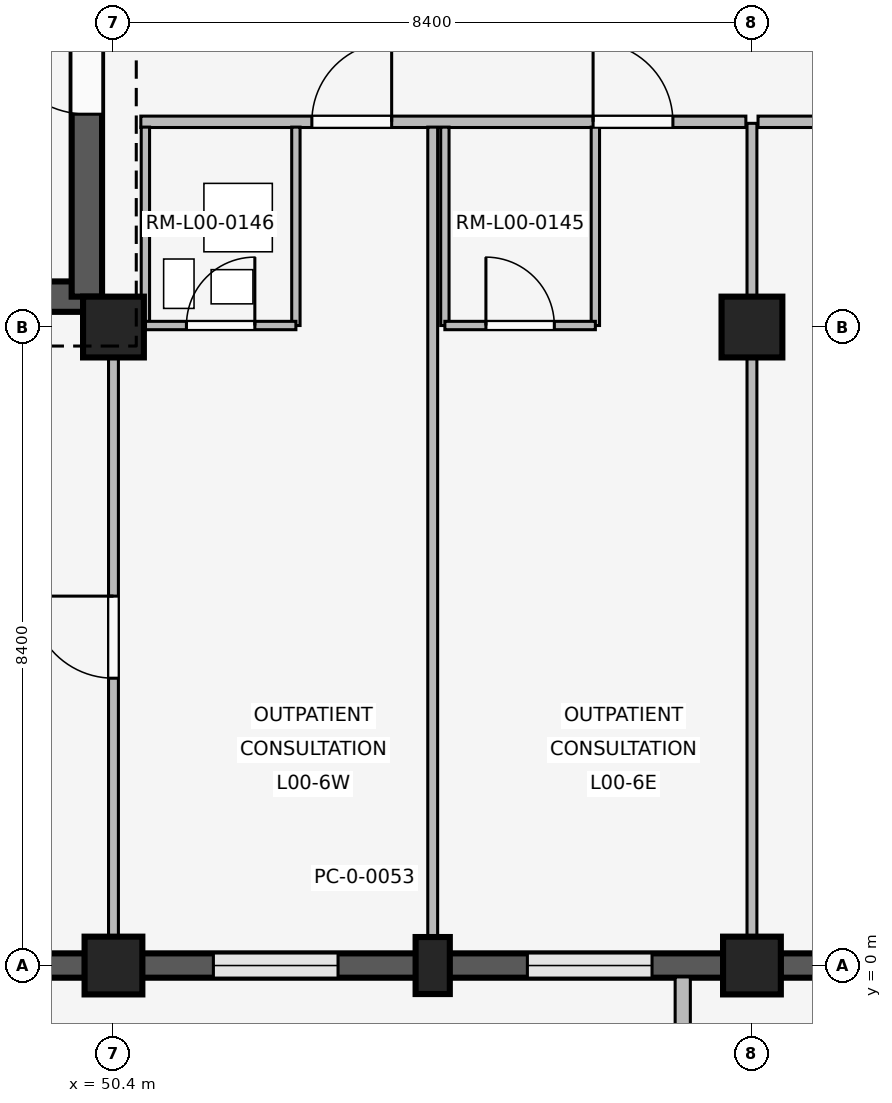
"""IFC4 building model, lengths in metres.
Left out: names, types, materials, properties, quantities, classifications, styles, units other than length and angle.
Written with IfcOpenShell. Run it as: python <this file> out.ifc"""

import sys

from ifc_helpers import new_model, si_unit, direction, frame, frame_2d, origin, origin_2d, place, context, subcontext, project, spatial, rectangle, extrude, element, fill, save


model = new_model("IFC4")
c1 = context("Model", 3, precision=1e-05, world=origin(), true_north=direction((0.0, 1.0)))
c2 = subcontext(c1, "Body", "Model", "MODEL_VIEW")
j1 = project(units=[si_unit("LENGTHUNIT", "METRE"), si_unit("PLANEANGLEUNIT", "RADIAN")], contexts=[c1])
p1 = place(None, origin())
s1 = spatial("IfcSite", under=j1, at=p1, CompositionType="ELEMENT")
p2 = place(p1, origin())
s2 = spatial("IfcBuilding", under=s1, at=p2, CompositionType="ELEMENT")
p3 = place(p2, origin())
s3 = spatial("IfcBuildingStorey", under=s2, at=p3, CompositionType="ELEMENT", Elevation=0.0)
p4 = place(p3, frame((50.4, 0.0, 0.0), z_axis=(0.0, 0.0, 1.0), x_axis=(1.0, 0.0, 0.0)))
e1 = element("IfcColumn", 1, at=p4, inside=s3, PredefinedType="COLUMN", context=c2, shape_type="SweptSolid", body=[
    extrude(rectangle(XDim=0.76, YDim=0.76, at=origin_2d()), origin(), (0.0, 0.0, 1.0), 4.8),
])
p5 = place(p3, frame((50.4, 8.4, 0.0), z_axis=(0.0, 0.0, 1.0), x_axis=(1.0, 0.0, 0.0)))
e2 = element("IfcColumn", 2, at=p5, inside=s3, PredefinedType="COLUMN", context=c2, shape_type="SweptSolid", body=[
    extrude(rectangle(XDim=0.8, YDim=0.8, at=origin_2d()), origin(), (0.0, 0.0, 1.0), 4.8),
])
p6 = place(p3, frame((58.8, 0.0, 0.0), z_axis=(0.0, 0.0, 1.0), x_axis=(1.0, 0.0, 0.0)))
e3 = element("IfcColumn", 3, at=p6, inside=s3, PredefinedType="COLUMN", context=c2, shape_type="SweptSolid", body=[
    extrude(rectangle(XDim=0.76, YDim=0.76, at=origin_2d()), origin(), (0.0, 0.0, 1.0), 4.8),
])
p7 = place(p3, frame((58.8, 8.4, 0.0), z_axis=(0.0, 0.0, 1.0), x_axis=(1.0, 0.0, 0.0)))
e4 = element("IfcColumn", 4, at=p7, inside=s3, PredefinedType="COLUMN", context=c2, shape_type="SweptSolid", body=[
    extrude(rectangle(XDim=0.8, YDim=0.8, at=origin_2d()), origin(), (0.0, 0.0, 1.0), 4.8),
])
p8 = place(p3, frame((54.6, 0.0, 0.0), z_axis=(0.0, 0.0, 1.0), x_axis=(1.0, 0.0, 0.0)))
e5 = element("IfcColumn", 5, at=p8, inside=s3, PredefinedType="PILASTER", context=c2, shape_type="SweptSolid", body=[
    extrude(rectangle(XDim=0.45, YDim=0.75, at=origin_2d()), origin(), (0.0, 0.0, 1.0), 4.8),
])
p9 = place(p3, frame((50.025, 0.0, 0.0), z_axis=(0.0, 0.0, 1.0), x_axis=(-1.0, 0.0, 0.0)))
e6 = element("IfcWall", 6, at=p9, inside=s3, PredefinedType="SOLIDWALL", context=c2, shape_type="SweptSolid", body=[
    extrude(rectangle(XDim=7.65, YDim=0.32, at=frame_2d((3.825, 0.0))), origin(), (0.0, 0.0, 1.0), 3.82),
])
p10 = place(p9, frame((5.375, 0.0, 0.0)))
e7 = element("IfcOpeningElement", 7, at=p10, cuts=e6, PredefinedType="OPENING", context=c2, shape_type="SweptSolid", body=[
    extrude(rectangle(XDim=1.2, YDim=2.25, at=frame_2d((0.6, 1.125))), frame((0.0, 0.17, 0.0), z_axis=(0.0, -1.0, 0.0), x_axis=(1.0, 0.0, 0.0)), (0.0, 0.0, 1.0), 0.34),
])
p11 = place(p9, frame((0.8, 0.0, 0.85)))
e8 = element("IfcOpeningElement", 8, at=p11, cuts=e6, PredefinedType="OPENING", context=c2, shape_type="SweptSolid", body=[
    extrude(rectangle(XDim=1.1, YDim=1.6, at=frame_2d((0.55, 0.8))), frame((0.0, 0.17, 0.0), z_axis=(0.0, -1.0, 0.0), x_axis=(1.0, 0.0, 0.0)), (0.0, 0.0, 1.0), 0.34),
])
p12 = place(p9, frame((2.9, 0.0, 0.85)))
e9 = element("IfcOpeningElement", 9, at=p12, cuts=e6, PredefinedType="OPENING", context=c2, shape_type="SweptSolid", body=[
    extrude(rectangle(XDim=1.1, YDim=1.6, at=frame_2d((0.55, 0.8))), frame((0.0, 0.17, 0.0), z_axis=(0.0, -1.0, 0.0), x_axis=(1.0, 0.0, 0.0)), (0.0, 0.0, 1.0), 0.34),
])
p13 = place(p3, frame((58.425, 0.0, 0.0), z_axis=(0.0, 0.0, 1.0), x_axis=(-1.0, 0.0, 0.0)))
e10 = element("IfcWall", 10, at=p13, inside=s3, PredefinedType="SOLIDWALL", context=c2, shape_type="SweptSolid", body=[
    extrude(rectangle(XDim=7.65, YDim=0.32, at=frame_2d((3.825, 0.0))), origin(), (0.0, 0.0, 1.0), 3.82),
])
p14 = place(p13, frame((0.939, 0.0, 0.85)))
e11 = element("IfcOpeningElement", 11, at=p14, cuts=e10, PredefinedType="OPENING", context=c2, shape_type="SweptSolid", body=[
    extrude(rectangle(XDim=1.64, YDim=1.75, at=frame_2d((0.82, 0.875))), frame((0.0, 0.17, 0.0), z_axis=(0.0, -1.0, 0.0), x_axis=(1.0, 0.0, 0.0)), (0.0, 0.0, 1.0), 0.34),
])
p15 = place(p13, frame((5.071, 0.0, 0.85)))
e12 = element("IfcOpeningElement", 12, at=p15, cuts=e10, PredefinedType="OPENING", context=c2, shape_type="SweptSolid", body=[
    extrude(rectangle(XDim=1.64, YDim=1.75, at=frame_2d((0.82, 0.875))), frame((0.0, 0.17, 0.0), z_axis=(0.0, -1.0, 0.0), x_axis=(1.0, 0.0, 0.0)), (0.0, 0.0, 1.0), 0.34),
])
p16 = place(p3, frame((57.889, -0.15, 0.0), z_axis=(0.0, 0.0, 1.0), x_axis=(0.0, -1.0, 0.0)))
e13 = element("IfcWall", 13, at=p16, inside=s3, PredefinedType="ELEMENTEDWALL", context=c2, shape_type="SweptSolid", body=[
    extrude(rectangle(XDim=0.85, YDim=0.2, at=frame_2d((0.425, 0.0))), origin(), (0.0, 0.0, 1.0), 3.8),
])
p17 = place(p3, frame((66.825, 0.0, 0.0), z_axis=(0.0, 0.0, 1.0), x_axis=(-1.0, 0.0, 0.0)))
e14 = element("IfcWall", 14, at=p17, inside=s3, PredefinedType="SOLIDWALL", context=c2, shape_type="SweptSolid", body=[
    extrude(rectangle(XDim=7.65, YDim=0.32, at=frame_2d((3.825, 0.0))), origin(), (0.0, 0.0, 1.0), 3.82),
])
p18 = place(p17, frame((2.825, 0.0, 0.0)))
e15 = element("IfcOpeningElement", 15, at=p18, cuts=e14, PredefinedType="OPENING", context=c2, shape_type="SweptSolid", body=[
    extrude(rectangle(XDim=2.0, YDim=2.4, at=frame_2d((1.0, 1.2))), frame((0.0, 0.17, 0.0), z_axis=(0.0, -1.0, 0.0), x_axis=(1.0, 0.0, 0.0)), (0.0, 0.0, 1.0), 0.34),
])
p19 = place(p3, frame((42.55, 8.8, 0.0), z_axis=(0.0, 0.0, 1.0), x_axis=(1.0, 0.0, 0.0)))
e16 = element("IfcWall", 16, at=p19, inside=s3, PredefinedType="SHEAR", context=c2, shape_type="SweptSolid", body=[
    extrude(rectangle(XDim=7.5, YDim=0.4, at=frame_2d((3.75, 0.0))), origin(), (0.0, 0.0, 1.0), 4.52),
])
p20 = place(p19, frame((4.85, 0.0, 0.0)))
e17 = element("IfcOpeningElement", 17, at=p20, cuts=e16, PredefinedType="OPENING", context=c2, shape_type="SweptSolid", body=[
    extrude(rectangle(XDim=1.2, YDim=2.2, at=frame_2d((0.6, 1.1))), frame((0.0, 0.21, 0.0), z_axis=(0.0, -1.0, 0.0), x_axis=(1.0, 0.0, 0.0)), (0.0, 0.0, 1.0), 0.42),
])
p21 = place(p19, frame((0.9, 0.0, 0.0)))
e18 = element("IfcOpeningElement", 18, at=p21, cuts=e16, PredefinedType="OPENING", context=c2, shape_type="SweptSolid", body=[
    extrude(rectangle(XDim=1.2, YDim=2.2, at=frame_2d((0.6, 1.1))), frame((0.0, 0.21, 0.0), z_axis=(0.0, -1.0, 0.0), x_axis=(1.0, 0.0, 0.0)), (0.0, 0.0, 1.0), 0.42),
])
p22 = place(p3, frame((50.05, 8.8, 0.0), z_axis=(0.0, 0.0, 1.0), x_axis=(0.0, 1.0, 0.0)))
e19 = element("IfcWall", 19, at=p22, inside=s3, PredefinedType="SHEAR", context=c2, shape_type="SweptSolid", body=[
    extrude(rectangle(XDim=7.55, YDim=0.4, at=frame_2d((3.775, 0.0))), origin(), (0.0, 0.0, 1.0), 4.52),
])
p23 = place(p22, frame((2.4, 0.0, 0.0)))
e20 = element("IfcOpeningElement", 20, at=p23, cuts=e19, PredefinedType="OPENING", context=c2, shape_type="SweptSolid", body=[
    extrude(rectangle(XDim=1.2, YDim=2.2, at=frame_2d((0.6, 1.1))), frame((0.0, 0.21, 0.0), z_axis=(0.0, -1.0, 0.0), x_axis=(1.0, 0.0, 0.0)), (0.0, 0.0, 1.0), 0.42),
])
p24 = place(p3, frame((50.4, 0.14, 0.0), z_axis=(0.0, 0.0, 1.0), x_axis=(0.0, 1.0, 0.0)))
e21 = element("IfcWall", 21, at=p24, inside=s3, PredefinedType="PARTITIONING", context=c2, shape_type="SweptSolid", body=[
    extrude(rectangle(XDim=8.21, YDim=0.13, at=frame_2d((4.105, 0.0))), origin(), (0.0, 0.0, 1.0), 3.8),
])
p25 = place(p24, frame((3.64, 0.0, 0.0)))
e22 = element("IfcOpeningElement", 22, at=p25, cuts=e21, PredefinedType="OPENING", context=c2, shape_type="SweptSolid", body=[
    extrude(rectangle(XDim=1.08, YDim=2.15, at=frame_2d((0.54, 1.075))), frame((0.0, 0.075, 0.0), z_axis=(0.0, -1.0, 0.0), x_axis=(1.0, 0.0, 0.0)), (0.0, 0.0, 1.0), 0.15),
])
p26 = place(p3, frame((50.76, 11.1, 0.0), z_axis=(0.0, 0.0, 1.0), x_axis=(1.0, 0.0, 0.0)))
e23 = element("IfcWall", 23, at=p26, inside=s3, PredefinedType="PARTITIONING", context=c2, shape_type="SweptSolid", body=[
    extrude(rectangle(XDim=7.96, YDim=0.15, at=frame_2d((3.98, 0.0))), origin(), (0.0, 0.0, 1.0), 3.8),
])
p27 = place(p26, frame((2.25, 0.0, 0.0)))
e24 = element("IfcOpeningElement", 24, at=p27, cuts=e23, PredefinedType="OPENING", context=c2, shape_type="SweptSolid", body=[
    extrude(rectangle(XDim=1.05, YDim=2.2, at=frame_2d((0.525, 1.1))), frame((0.0, 0.085, 0.0), z_axis=(0.0, -1.0, 0.0), x_axis=(1.0, 0.0, 0.0)), (0.0, 0.0, 1.0), 0.17),
])
p28 = place(p26, frame((5.95, 0.0, 0.0)))
e25 = element("IfcOpeningElement", 25, at=p28, cuts=e23, PredefinedType="OPENING", context=c2, shape_type="SweptSolid", body=[
    extrude(rectangle(XDim=1.05, YDim=2.2, at=frame_2d((0.525, 1.1))), frame((0.0, 0.085, 0.0), z_axis=(0.0, -1.0, 0.0), x_axis=(1.0, 0.0, 0.0)), (0.0, 0.0, 1.0), 0.17),
])
p29 = place(p3, frame((54.6, 0.1, 0.0), z_axis=(0.0, 0.0, 1.0), x_axis=(0.0, 1.0, 0.0)))
e26 = element("IfcWall", 26, at=p29, inside=s3, PredefinedType="PARTITIONING", context=c2, shape_type="SweptSolid", body=[
    extrude(rectangle(XDim=10.93, YDim=0.13, at=frame_2d((5.465, 0.0))), origin(), (0.0, 0.0, 1.0), 3.8),
])
for number, where, z_axis, x_axis in (
    (27, (50.82, 8.42, 0.0), (0.0, 0.0, 1.0), (0.0, 1.0, 0.0)),
    (28, (52.8, 8.42, 0.0), (0.0, 0.0, 1.0), (0.0, 1.0, 0.0)),
):
    element("IfcWall", number, at=place(p3, frame(where, z_axis=z_axis, x_axis=x_axis)), inside=s3, PredefinedType="PARTITIONING", context=c2, shape_type="SweptSolid", body=[
        extrude(rectangle(XDim=2.61, YDim=0.11, at=frame_2d((1.305, 0.0))), origin(), (0.0, 0.0, 1.0), 3.8),
    ])
p30 = place(p3, frame((50.82, 8.42, 0.0), z_axis=(0.0, 0.0, 1.0), x_axis=(1.0, 0.0, 0.0)))
e29 = element("IfcWall", 29, at=p30, inside=s3, PredefinedType="PARTITIONING", context=c2, shape_type="SweptSolid", body=[
    extrude(rectangle(XDim=1.98, YDim=0.11, at=frame_2d((0.99, 0.0))), origin(), (0.0, 0.0, 1.0), 3.8),
])
p31 = place(p30, frame((0.54, 0.0, 0.0)))
e30 = element("IfcOpeningElement", 30, at=p31, cuts=e29, PredefinedType="OPENING", context=c2, shape_type="SweptSolid", body=[
    extrude(rectangle(XDim=0.9, YDim=2.1, at=frame_2d((0.45, 1.05))), frame((0.0, 0.065, 0.0), z_axis=(0.0, -1.0, 0.0), x_axis=(1.0, 0.0, 0.0)), (0.0, 0.0, 1.0), 0.13),
])
for number, where, z_axis, x_axis in (
    (31, (54.76, 8.42, 0.0), (0.0, 0.0, 1.0), (0.0, 1.0, 0.0)),
    (32, (56.74, 8.42, 0.0), (0.0, 0.0, 1.0), (0.0, 1.0, 0.0)),
):
    element("IfcWall", number, at=place(p3, frame(where, z_axis=z_axis, x_axis=x_axis)), inside=s3, PredefinedType="PARTITIONING", context=c2, shape_type="SweptSolid", body=[
        extrude(rectangle(XDim=2.61, YDim=0.11, at=frame_2d((1.305, 0.0))), origin(), (0.0, 0.0, 1.0), 3.8),
    ])
p32 = place(p3, frame((54.76, 8.42, 0.0), z_axis=(0.0, 0.0, 1.0), x_axis=(1.0, 0.0, 0.0)))
e33 = element("IfcWall", 33, at=p32, inside=s3, PredefinedType="PARTITIONING", context=c2, shape_type="SweptSolid", body=[
    extrude(rectangle(XDim=1.98, YDim=0.11, at=frame_2d((0.99, 0.0))), origin(), (0.0, 0.0, 1.0), 3.8),
])
p33 = place(p32, frame((0.54, 0.0, 0.0)))
e34 = element("IfcOpeningElement", 34, at=p33, cuts=e33, PredefinedType="OPENING", context=c2, shape_type="SweptSolid", body=[
    extrude(rectangle(XDim=0.9, YDim=2.1, at=frame_2d((0.45, 1.05))), frame((0.0, 0.065, 0.0), z_axis=(0.0, -1.0, 0.0), x_axis=(1.0, 0.0, 0.0)), (0.0, 0.0, 1.0), 0.13),
])
p34 = place(p3, frame((53.25, 1.15, 0.0), z_axis=(0.0, 0.0, 1.0), x_axis=(1.0, 0.0, 0.0)))
e35 = element("IfcWall", 35, at=p34, inside=s3, PredefinedType="PLUMBINGWALL", context=c2, shape_type="SweptSolid", body=[
    extrude(rectangle(XDim=0.9, YDim=0.24, at=frame_2d((0.45, 0.0))), origin(), (0.0, 0.0, 1.0), 3.8),
])
p35 = place(p3, frame((58.8, 0.14, 0.0), z_axis=(0.0, 0.0, 1.0), x_axis=(0.0, 1.0, 0.0)))
e36 = element("IfcWall", 36, at=p35, inside=s3, PredefinedType="PARTITIONING", context=c2, shape_type="SweptSolid", body=[
    extrude(rectangle(XDim=10.94, YDim=0.13, at=frame_2d((5.47, 0.0))), origin(), (0.0, 0.0, 1.0), 3.8),
])
p36 = place(p3, frame((58.88, 11.1, 0.0), z_axis=(0.0, 0.0, 1.0), x_axis=(1.0, 0.0, 0.0)))
e37 = element("IfcWall", 37, at=p36, inside=s3, PredefinedType="PARTITIONING", context=c2, shape_type="SweptSolid", body=[
    extrude(rectangle(XDim=8.24, YDim=0.15, at=frame_2d((4.12, 0.0))), origin(), (0.0, 0.0, 1.0), 3.8),
])
p37 = place(p36, frame((1.53, 0.0, 0.0)))
e38 = element("IfcOpeningElement", 38, at=p37, cuts=e37, PredefinedType="OPENING", context=c2, shape_type="SweptSolid", body=[
    extrude(rectangle(XDim=1.85, YDim=2.3, at=frame_2d((0.925, 1.15))), frame((0.0, 0.085, 0.0), z_axis=(0.0, -1.0, 0.0), x_axis=(1.0, 0.0, 0.0)), (0.0, 0.0, 1.0), 0.17),
])
p38 = place(p14, origin())
e39 = element("IfcWindow", 39, at=p38, inside=s3, PartitioningType="SINGLE_PANEL", PredefinedType="WINDOW", context=c2, shape_type="SweptSolid", body=[
    extrude(rectangle(XDim=1.64, YDim=1.75, at=frame_2d((0.82, 0.875))), frame((0.0, 0.03, 0.0), z_axis=(0.0, -1.0, 0.0), x_axis=(1.0, 0.0, 0.0)), (0.0, 0.0, 1.0), 0.06),
])
fill(e11, e39)
p39 = place(p15, origin())
e40 = element("IfcWindow", 40, at=p39, inside=s3, PartitioningType="SINGLE_PANEL", PredefinedType="WINDOW", context=c2, shape_type="SweptSolid", body=[
    extrude(rectangle(XDim=1.64, YDim=1.75, at=frame_2d((0.82, 0.875))), frame((0.0, 0.03, 0.0), z_axis=(0.0, -1.0, 0.0), x_axis=(1.0, 0.0, 0.0)), (0.0, 0.0, 1.0), 0.06),
])
fill(e12, e40)
p40 = place(p23, origin())
e41 = element("IfcDoor", 41, at=p40, inside=s3, OperationType="SINGLE_SWING_RIGHT", PredefinedType="DOOR", context=c2, shape_type="SweptSolid", body=[
    extrude(rectangle(XDim=1.2, YDim=2.2, at=frame_2d((0.6, 1.1))), frame((0.0, 0.025, 0.0), z_axis=(0.0, -1.0, 0.0), x_axis=(1.0, 0.0, 0.0)), (0.0, 0.0, 1.0), 0.05),
])
fill(e20, e41)
p41 = place(p25, origin())
e42 = element("IfcDoor", 42, at=p41, inside=s3, OperationType="SINGLE_SWING_RIGHT", PredefinedType="DOOR", context=c2, shape_type="SweptSolid", body=[
    extrude(rectangle(XDim=1.08, YDim=2.15, at=frame_2d((0.54, 1.075))), frame((0.0, 0.025, 0.0), z_axis=(0.0, -1.0, 0.0), x_axis=(1.0, 0.0, 0.0)), (0.0, 0.0, 1.0), 0.05),
])
fill(e22, e42)
p42 = place(p27, origin())
e43 = element("IfcDoor", 43, at=p42, inside=s3, OperationType="SINGLE_SWING_RIGHT", PredefinedType="DOOR", context=c2, shape_type="SweptSolid", body=[
    extrude(rectangle(XDim=1.05, YDim=2.2, at=frame_2d((0.525, 1.1))), frame((0.0, 0.025, 0.0), z_axis=(0.0, -1.0, 0.0), x_axis=(1.0, 0.0, 0.0)), (0.0, 0.0, 1.0), 0.05),
])
fill(e24, e43)
p43 = place(p28, origin())
e44 = element("IfcDoor", 44, at=p43, inside=s3, OperationType="SINGLE_SWING_LEFT", PredefinedType="DOOR", context=c2, shape_type="SweptSolid", body=[
    extrude(rectangle(XDim=1.05, YDim=2.2, at=frame_2d((0.525, 1.1))), frame((0.0, 0.025, 0.0), z_axis=(0.0, -1.0, 0.0), x_axis=(1.0, 0.0, 0.0)), (0.0, 0.0, 1.0), 0.05),
])
fill(e25, e44)
p44 = place(p31, origin())
e45 = element("IfcDoor", 45, at=p44, inside=s3, OperationType="SINGLE_SWING_RIGHT", PredefinedType="DOOR", context=c2, shape_type="SweptSolid", body=[
    extrude(rectangle(XDim=0.9, YDim=2.1, at=frame_2d((0.45, 1.05))), frame((0.0, 0.025, 0.0), z_axis=(0.0, -1.0, 0.0), x_axis=(1.0, 0.0, 0.0)), (0.0, 0.0, 1.0), 0.05),
])
fill(e30, e45)
p45 = place(p33, origin())
e46 = element("IfcDoor", 46, at=p45, inside=s3, OperationType="SINGLE_SWING_LEFT", PredefinedType="DOOR", context=c2, shape_type="SweptSolid", body=[
    extrude(rectangle(XDim=0.9, YDim=2.1, at=frame_2d((0.45, 1.05))), frame((0.0, 0.025, 0.0), z_axis=(0.0, -1.0, 0.0), x_axis=(1.0, 0.0, 0.0)), (0.0, 0.0, 1.0), 0.05),
])
fill(e34, e46)
save(model, sys.argv[1])
